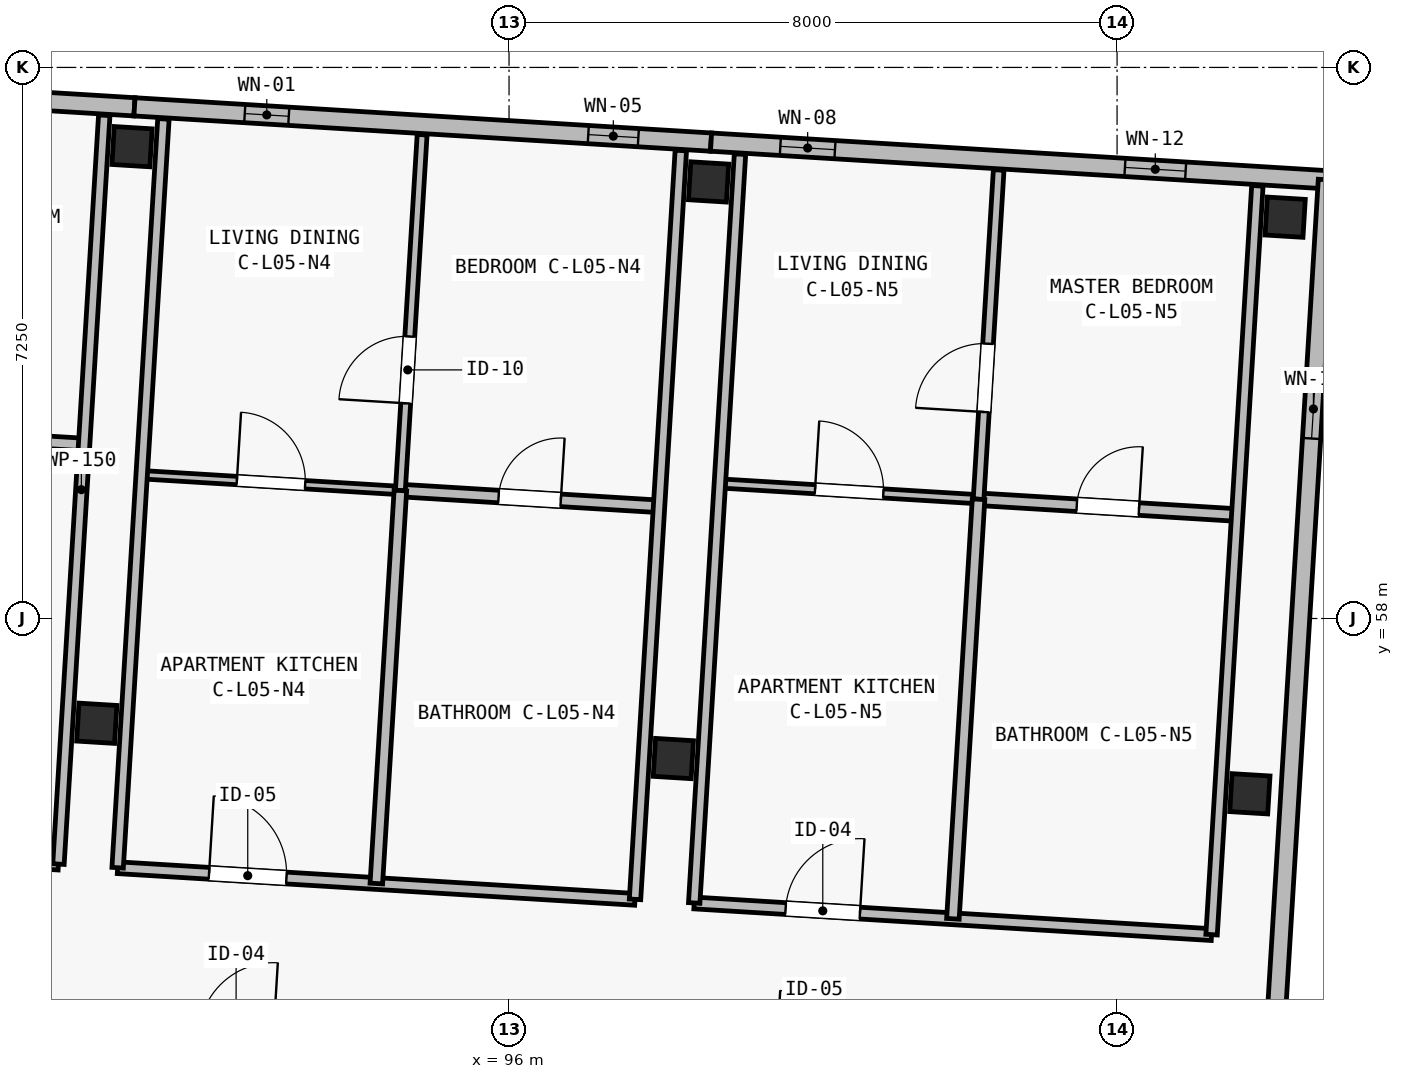
"""IFC4 building model, lengths in metres.
Left out: names, types, materials, properties, quantities, classifications, styles, units other than length and angle.
Written with IfcOpenShell. Run it as: python <this file> out.ifc"""

import sys

from ifc_helpers import new_model, si_unit, direction, frame, frame_2d, origin, origin_2d, place, context, subcontext, project, spatial, rectangle, extrude, element, fill, save


model = new_model("IFC4")
c1 = context("Model", 3, precision=1e-05, world=origin(), true_north=direction((0.0, 1.0)))
c2 = subcontext(c1, "Body", "Model", "MODEL_VIEW")
j1 = project(units=[si_unit("LENGTHUNIT", "METRE"), si_unit("PLANEANGLEUNIT", "RADIAN")], contexts=[c1])
p1 = place(None, origin())
s1 = spatial("IfcSite", under=j1, at=p1, CompositionType="ELEMENT")
p2 = place(p1, origin())
s2 = spatial("IfcBuilding", under=s1, at=p2, CompositionType="ELEMENT")
p3 = place(p2, frame((0.0, 0.0, 18.15)))
s3 = spatial("IfcBuildingStorey", under=s2, at=p3, CompositionType="ELEMENT", Elevation=18.15)
for number, where, z_axis, x_axis in (
    (1, (90.576, 56.622, 0.0), (0.0, 0.0, 1.0), (0.998, -0.061, 0.0)),
    (2, (91.04, 64.208, 0.0), (0.0, 0.0, 1.0), (0.998, -0.061, 0.0)),
    (3, (98.162, 56.158, 0.0), (0.0, 0.0, 1.0), (0.998, -0.061, 0.0)),
    (4, (98.626, 63.744, 0.0), (0.0, 0.0, 1.0), (0.998, -0.061, 0.0)),
    (5, (105.748, 55.694, 0.0), (0.0, 0.0, 1.0), (0.998, -0.061, 0.0)),
    (6, (106.211, 63.28, 0.0), (0.0, 0.0, 1.0), (0.998, -0.061, 0.0)),
):
    element("IfcColumn", number, at=place(p3, frame(where, z_axis=z_axis, x_axis=x_axis)), inside=s3, PredefinedType="COLUMN", context=c2, shape_type="SweptSolid", body=[
        extrude(rectangle(XDim=0.5, YDim=0.5, at=origin_2d()), origin(), (0.0, 0.0, 1.0), 3.25),
    ])
p4 = place(p3, frame((83.486, 65.196, 0.0), z_axis=(0.0, 0.0, 1.0), x_axis=(0.998135669243, -0.061034300063, 0.0)))
e7 = element("IfcWall", 7, at=p4, inside=s3, PredefinedType="SOLIDWALL", context=c2, shape_type="SweptSolid", body=[
    extrude(rectangle(XDim=7.6, YDim=0.24, at=frame_2d((3.8, 0.0))), origin(), (0.0, 0.0, 1.0), 3.0),
])
p5 = place(p4, frame((1.807, 0.0, 0.44)))
e8 = element("IfcOpeningElement", 8, at=p5, cuts=e7, PredefinedType="OPENING", context=c2, shape_type="SweptSolid", body=[
    extrude(rectangle(XDim=0.74, YDim=2.26, at=frame_2d((0.37, 1.13))), frame((0.0, 0.135, 0.0), z_axis=(0.0, -1.0, 0.0), x_axis=(1.0, 0.0, 0.0)), (0.0, 0.0, 1.0), 0.27),
])
p6 = place(p4, frame((5.006, 0.0, 0.5)))
e9 = element("IfcOpeningElement", 9, at=p6, cuts=e7, PredefinedType="OPENING", context=c2, shape_type="SweptSolid", body=[
    extrude(rectangle(XDim=0.82, YDim=2.18, at=frame_2d((0.41, 1.09))), frame((0.0, 0.135, 0.0), z_axis=(0.0, -1.0, 0.0), x_axis=(1.0, 0.0, 0.0)), (0.0, 0.0, 1.0), 0.27),
])
p7 = place(p3, frame((91.072, 64.732, 0.0), z_axis=(0.0, 0.0, 1.0), x_axis=(0.998133591969, -0.061068261669, 0.0)))
e10 = element("IfcWall", 10, at=p7, inside=s3, PredefinedType="SOLIDWALL", context=c2, shape_type="SweptSolid", body=[
    extrude(rectangle(XDim=7.6, YDim=0.24, at=frame_2d((3.8, 0.0))), origin(), (0.0, 0.0, 1.0), 3.0),
])
p8 = place(p7, frame((1.454, 0.0, 0.5)))
e11 = element("IfcOpeningElement", 11, at=p8, cuts=e10, PredefinedType="OPENING", context=c2, shape_type="SweptSolid", body=[
    extrude(rectangle(XDim=0.58, YDim=2.16, at=frame_2d((0.29, 1.08))), frame((0.0, 0.135, 0.0), z_axis=(0.0, -1.0, 0.0), x_axis=(1.0, 0.0, 0.0)), (0.0, 0.0, 1.0), 0.27),
])
p9 = place(p7, frame((5.982, 0.0, 0.44)))
e12 = element("IfcOpeningElement", 12, at=p9, cuts=e10, PredefinedType="OPENING", context=c2, shape_type="SweptSolid", body=[
    extrude(rectangle(XDim=0.66, YDim=2.32, at=frame_2d((0.33, 1.16))), frame((0.0, 0.135, 0.0), z_axis=(0.0, -1.0, 0.0), x_axis=(1.0, 0.0, 0.0)), (0.0, 0.0, 1.0), 0.27),
])
p10 = place(p3, frame((98.658, 64.268, 0.0), z_axis=(0.0, 0.0, 1.0), x_axis=(0.998134248939, -0.061057522844, 0.0)))
e13 = element("IfcWall", 13, at=p10, inside=s3, PredefinedType="SOLIDWALL", context=c2, shape_type="SweptSolid", body=[
    extrude(rectangle(XDim=8.125, YDim=0.24, at=frame_2d((4.062, 0.0))), origin(), (0.0, 0.0, 1.0), 3.0),
])
p11 = place(p10, frame((0.914, 0.0, 0.44)))
e14 = element("IfcOpeningElement", 14, at=p11, cuts=e13, PredefinedType="OPENING", context=c2, shape_type="SweptSolid", body=[
    extrude(rectangle(XDim=0.72, YDim=2.16, at=frame_2d((0.36, 1.08))), frame((0.0, 0.135, 0.0), z_axis=(0.0, -1.0, 0.0), x_axis=(1.0, 0.0, 0.0)), (0.0, 0.0, 1.0), 0.27),
])
p12 = place(p10, frame((5.456, 0.0, 0.5)))
e15 = element("IfcOpeningElement", 15, at=p12, cuts=e13, PredefinedType="OPENING", context=c2, shape_type="SweptSolid", body=[
    extrude(rectangle(XDim=0.8, YDim=2.3, at=frame_2d((0.4, 1.15))), frame((0.0, 0.135, 0.0), z_axis=(0.0, -1.0, 0.0), x_axis=(1.0, 0.0, 0.0)), (0.0, 0.0, 1.0), 0.27),
])
p13 = place(p3, frame((106.768, 63.771, 0.0), z_axis=(0.0, 0.0, 1.0), x_axis=(-0.061053332998, -0.99813450523, 0.0)))
e16 = element("IfcWall", 16, at=p13, inside=s3, PredefinedType="SOLIDWALL", context=c2, shape_type="SweptSolid", body=[
    extrude(rectangle(XDim=20.65, YDim=0.24, at=frame_2d((10.325, 0.0))), origin(), (0.0, 0.0, 1.0), 3.0),
])
p14 = place(p13, frame((2.63, 0.0, 0.52)))
e17 = element("IfcOpeningElement", 17, at=p14, cuts=e16, PredefinedType="OPENING", context=c2, shape_type="SweptSolid", body=[
    extrude(rectangle(XDim=0.78, YDim=2.2, at=frame_2d((0.39, 1.1))), frame((0.0, 0.135, 0.0), z_axis=(0.0, -1.0, 0.0), x_axis=(1.0, 0.0, 0.0)), (0.0, 0.0, 1.0), 0.27),
])
p15 = place(p13, frame((17.04, 0.0, 0.45)))
e18 = element("IfcOpeningElement", 18, at=p15, cuts=e16, PredefinedType="OPENING", context=c2, shape_type="SweptSolid", body=[
    extrude(rectangle(XDim=0.62, YDim=2.28, at=frame_2d((0.31, 1.14))), frame((0.0, 0.135, 0.0), z_axis=(0.0, -1.0, 0.0), x_axis=(1.0, 0.0, 0.0)), (0.0, 0.0, 1.0), 0.27),
])
p16 = place(p3, frame((83.007, 53.097, 0.0), z_axis=(0.0, 0.0, 1.0), x_axis=(0.998135666539, -0.061034344288, 0.0)))
e19 = element("IfcWall", 19, at=p16, inside=s3, PredefinedType="PARTITIONING", context=c2, shape_type="SweptSolid", body=[
    extrude(rectangle(XDim=7.08, YDim=0.155, at=frame_2d((3.54, 0.0))), origin(), (0.0, 0.0, 1.0), 2.97),
])
p17 = place(p16, frame((1.33, 0.0, 0.0)))
e20 = element("IfcOpeningElement", 20, at=p17, cuts=e19, PredefinedType="OPENING", context=c2, shape_type="SweptSolid", body=[
    extrude(rectangle(XDim=1.02, YDim=2.2, at=frame_2d((0.51, 1.1))), frame((0.0, 0.093, 0.0), z_axis=(0.0, -1.0, 0.0), x_axis=(1.0, 0.0, 0.0)), (0.0, 0.0, 1.0), 0.185),
])
p18 = place(p3, frame((83.265, 55.185, 0.0), z_axis=(0.0, 0.0, 1.0), x_axis=(0.998135531673, -0.061036549799, 0.0)))
e21 = element("IfcWall", 21, at=p18, inside=s3, PredefinedType="PARTITIONING", context=c2, shape_type="SweptSolid", body=[
    extrude(rectangle(XDim=6.82, YDim=0.155, at=frame_2d((3.41, 0.0))), origin(), (0.0, 0.0, 1.0), 2.97),
])
p19 = place(p18, frame((1.205, 0.0, 0.0)))
e22 = element("IfcOpeningElement", 22, at=p19, cuts=e21, PredefinedType="OPENING", context=c2, shape_type="SweptSolid", body=[
    extrude(rectangle(XDim=0.98, YDim=2.15, at=frame_2d((0.49, 1.075))), frame((0.0, 0.093, 0.0), z_axis=(0.0, -1.0, 0.0), x_axis=(1.0, 0.0, 0.0)), (0.0, 0.0, 1.0), 0.185),
])
p20 = place(p3, frame((87.006, 60.497, 0.0), z_axis=(0.0, 0.0, 1.0), x_axis=(0.998137711988, -0.061000884486, 0.0)))
e23 = element("IfcWall", 23, at=p20, inside=s3, PredefinedType="PLUMBINGWALL", context=c2, shape_type="SweptSolid", body=[
    extrude(rectangle(XDim=3.41, YDim=0.165, at=frame_2d((1.705, 0.0))), origin(), (0.0, 0.0, 1.0), 2.97),
])
p21 = place(p20, frame((1.295, 0.0, 0.0)))
e24 = element("IfcOpeningElement", 24, at=p21, cuts=e23, PredefinedType="OPENING", context=c2, shape_type="SweptSolid", body=[
    extrude(rectangle(XDim=0.82, YDim=2.08, at=frame_2d((0.41, 1.04))), frame((0.0, 0.097, 0.0), z_axis=(0.0, -1.0, 0.0), x_axis=(1.0, 0.0, 0.0)), (0.0, 0.0, 1.0), 0.195),
])
p22 = place(p3, frame((90.072, 54.769, 0.0), z_axis=(0.0, 0.0, 1.0), x_axis=(0.061047700465, 0.998134849741, 0.0)))
e25 = element("IfcWall", 25, at=p22, inside=s3, PredefinedType="PARTITIONING", context=c2, shape_type="SweptSolid", body=[
    extrude(rectangle(XDim=9.87, YDim=0.15, at=frame_2d((4.935, 0.0))), origin(), (0.0, 0.0, 1.0), 2.97),
])
p23 = place(p3, frame((90.85, 54.721, 0.0), z_axis=(0.0, 0.0, 1.0), x_axis=(0.998135665032, -0.06103436893, 0.0)))
e26 = element("IfcWall", 26, at=p23, inside=s3, PredefinedType="PARTITIONING", context=c2, shape_type="SweptSolid", body=[
    extrude(rectangle(XDim=6.82, YDim=0.155, at=frame_2d((3.41, 0.0))), origin(), (0.0, 0.0, 1.0), 2.97),
])
p24 = place(p23, frame((1.205, 0.0, 0.0)))
e27 = element("IfcOpeningElement", 27, at=p24, cuts=e26, PredefinedType="OPENING", context=c2, shape_type="SweptSolid", body=[
    extrude(rectangle(XDim=1.02, YDim=2.2, at=frame_2d((0.51, 1.1))), frame((0.0, 0.093, 0.0), z_axis=(0.0, -1.0, 0.0), x_axis=(1.0, 0.0, 0.0)), (0.0, 0.0, 1.0), 0.185),
])
p25 = place(p3, frame((91.167, 59.892, 0.0), z_axis=(0.0, 0.0, 1.0), x_axis=(0.998133617109, -0.061067850767, 0.0)))
e28 = element("IfcWall", 28, at=p25, inside=s3, PredefinedType="PARTITIONING", context=c2, shape_type="SweptSolid", body=[
    extrude(rectangle(XDim=3.41, YDim=0.11, at=frame_2d((1.705, 0.0))), origin(), (0.0, 0.0, 1.0), 2.97),
])
p26 = place(p25, frame((1.255, 0.0, 0.0)))
e29 = element("IfcOpeningElement", 29, at=p26, cuts=e28, PredefinedType="OPENING", context=c2, shape_type="SweptSolid", body=[
    extrude(rectangle(XDim=0.9, YDim=2.1, at=frame_2d((0.45, 1.05))), frame((0.0, 0.07, 0.0), z_axis=(0.0, -1.0, 0.0), x_axis=(1.0, 0.0, 0.0)), (0.0, 0.0, 1.0), 0.14),
])
p27 = place(p3, frame((94.57, 59.684, 0.0), z_axis=(0.0, 0.0, 1.0), x_axis=(0.998133350094, -0.061072214879, 0.0)))
e30 = element("IfcWall", 30, at=p27, inside=s3, PredefinedType="PLUMBINGWALL", context=c2, shape_type="SweptSolid", body=[
    extrude(rectangle(XDim=3.41, YDim=0.165, at=frame_2d((1.705, 0.0))), origin(), (0.0, 0.0, 1.0), 2.97),
])
p28 = place(p27, frame((1.295, 0.0, 0.0)))
e31 = element("IfcOpeningElement", 31, at=p28, cuts=e30, PredefinedType="OPENING", context=c2, shape_type="SweptSolid", body=[
    extrude(rectangle(XDim=0.82, YDim=2.08, at=frame_2d((0.41, 1.04))), frame((0.0, 0.097, 0.0), z_axis=(0.0, -1.0, 0.0), x_axis=(1.0, 0.0, 0.0)), (0.0, 0.0, 1.0), 0.195),
])
p29 = place(p3, frame((94.57, 59.684, 0.0), z_axis=(0.0, 0.0, 1.0), x_axis=(0.061062434628, 0.998133948465, 0.0)))
e32 = element("IfcWall", 32, at=p29, inside=s3, PredefinedType="PARTITIONING", context=c2, shape_type="SweptSolid", body=[
    extrude(rectangle(XDim=4.69, YDim=0.13, at=frame_2d((2.345, 0.0))), origin(), (0.0, 0.0, 1.0), 2.97),
])
p30 = place(p29, frame((1.15, 0.0, 0.0)))
e33 = element("IfcOpeningElement", 33, at=p30, cuts=e32, PredefinedType="OPENING", context=c2, shape_type="SweptSolid", body=[
    extrude(rectangle(XDim=0.88, YDim=2.1, at=frame_2d((0.44, 1.05))), frame((0.0, 0.08, 0.0), z_axis=(0.0, -1.0, 0.0), x_axis=(1.0, 0.0, 0.0)), (0.0, 0.0, 1.0), 0.16),
])
p31 = place(p3, frame((94.254, 54.513, 0.0), z_axis=(0.0, 0.0, 1.0), x_axis=(0.061081315517, 0.998132793217, 0.0)))
e34 = element("IfcWall", 34, at=p31, inside=s3, PredefinedType="PLUMBINGWALL", context=c2, shape_type="SweptSolid", body=[
    extrude(rectangle(XDim=5.18, YDim=0.165, at=frame_2d((2.59, 0.0))), origin(), (0.0, 0.0, 1.0), 2.97),
])
for number, where, z_axis, x_axis in (
    (35, (90.85, 54.721, 0.0), (0.0, 0.0, 1.0), (0.061, 0.998, 0.0)),
    (36, (97.658, 54.305, 0.0), (0.0, 0.0, 1.0), (0.061, 0.998, 0.0)),
):
    element("IfcWall", number, at=place(p3, frame(where, z_axis=z_axis, x_axis=x_axis)), inside=s3, PredefinedType="PARTITIONING", context=c2, shape_type="SweptSolid", body=[
        extrude(rectangle(XDim=9.87, YDim=0.15, at=frame_2d((4.935, 0.0))), origin(), (0.0, 0.0, 1.0), 2.97),
    ])
p32 = place(p3, frame((98.436, 54.258, 0.0), z_axis=(0.0, 0.0, 1.0), x_axis=(0.998133350094, -0.061072214879, 0.0)))
e37 = element("IfcWall", 37, at=p32, inside=s3, PredefinedType="PARTITIONING", context=c2, shape_type="SweptSolid", body=[
    extrude(rectangle(XDim=6.82, YDim=0.155, at=frame_2d((3.41, 0.0))), origin(), (0.0, 0.0, 1.0), 2.97),
])
p33 = place(p32, frame((1.205, 0.0, 0.0)))
e38 = element("IfcOpeningElement", 38, at=p33, cuts=e37, PredefinedType="OPENING", context=c2, shape_type="SweptSolid", body=[
    extrude(rectangle(XDim=0.98, YDim=2.15, at=frame_2d((0.49, 1.075))), frame((0.0, 0.093, 0.0), z_axis=(0.0, -1.0, 0.0), x_axis=(1.0, 0.0, 0.0)), (0.0, 0.0, 1.0), 0.185),
])
p34 = place(p3, frame((98.774, 59.777, 0.0), z_axis=(0.0, 0.0, 1.0), x_axis=(0.998137711988, -0.061000884486, 0.0)))
e39 = element("IfcWall", 39, at=p34, inside=s3, PredefinedType="PARTITIONING", context=c2, shape_type="SweptSolid", body=[
    extrude(rectangle(XDim=3.41, YDim=0.12, at=frame_2d((1.705, 0.0))), origin(), (0.0, 0.0, 1.0), 2.97),
])
p35 = place(p34, frame((1.255, 0.0, 0.0)))
e40 = element("IfcOpeningElement", 40, at=p35, cuts=e39, PredefinedType="OPENING", context=c2, shape_type="SweptSolid", body=[
    extrude(rectangle(XDim=0.9, YDim=2.1, at=frame_2d((0.45, 1.05))), frame((0.0, 0.075, 0.0), z_axis=(0.0, -1.0, 0.0), x_axis=(1.0, 0.0, 0.0)), (0.0, 0.0, 1.0), 0.15),
])
p36 = place(p3, frame((102.177, 59.569, 0.0), z_axis=(0.0, 0.0, 1.0), x_axis=(0.998133350094, -0.061072214879, 0.0)))
e41 = element("IfcWall", 41, at=p36, inside=s3, PredefinedType="PLUMBINGWALL", context=c2, shape_type="SweptSolid", body=[
    extrude(rectangle(XDim=3.41, YDim=0.165, at=frame_2d((1.705, 0.0))), origin(), (0.0, 0.0, 1.0), 2.97),
])
p37 = place(p36, frame((1.295, 0.0, 0.0)))
e42 = element("IfcOpeningElement", 42, at=p37, cuts=e41, PredefinedType="OPENING", context=c2, shape_type="SweptSolid", body=[
    extrude(rectangle(XDim=0.82, YDim=2.08, at=frame_2d((0.41, 1.04))), frame((0.0, 0.097, 0.0), z_axis=(0.0, -1.0, 0.0), x_axis=(1.0, 0.0, 0.0)), (0.0, 0.0, 1.0), 0.195),
])
p38 = place(p3, frame((102.177, 59.569, 0.0), z_axis=(0.0, 0.0, 1.0), x_axis=(0.061036861365, 0.998135512621, 0.0)))
e43 = element("IfcWall", 43, at=p38, inside=s3, PredefinedType="PARTITIONING", context=c2, shape_type="SweptSolid", body=[
    extrude(rectangle(XDim=4.34, YDim=0.14, at=frame_2d((2.17, 0.0))), origin(), (0.0, 0.0, 1.0), 2.97),
])
p39 = place(p38, frame((1.15, 0.0, 0.0)))
e44 = element("IfcOpeningElement", 44, at=p39, cuts=e43, PredefinedType="OPENING", context=c2, shape_type="SweptSolid", body=[
    extrude(rectangle(XDim=0.9, YDim=2.1, at=frame_2d((0.45, 1.05))), frame((0.0, 0.085, 0.0), z_axis=(0.0, -1.0, 0.0), x_axis=(1.0, 0.0, 0.0)), (0.0, 0.0, 1.0), 0.17),
])
p40 = place(p3, frame((101.84, 54.049, 0.0), z_axis=(0.0, 0.0, 1.0), x_axis=(0.061056206715, 0.998134329447, 0.0)))
e45 = element("IfcWall", 45, at=p40, inside=s3, PredefinedType="PLUMBINGWALL", context=c2, shape_type="SweptSolid", body=[
    extrude(rectangle(XDim=5.53, YDim=0.165, at=frame_2d((2.765, 0.0))), origin(), (0.0, 0.0, 1.0), 2.97),
])
for number, where, z_axis, x_axis in (
    (46, (98.436, 54.258, 0.0), (0.0, 0.0, 1.0), (0.061, 0.998, 0.0)),
    (47, (105.243, 53.841, 0.0), (0.0, 0.0, 1.0), (0.061, 0.998, 0.0)),
):
    element("IfcWall", number, at=place(p3, frame(where, z_axis=z_axis, x_axis=x_axis)), inside=s3, PredefinedType="PARTITIONING", context=c2, shape_type="SweptSolid", body=[
        extrude(rectangle(XDim=9.87, YDim=0.15, at=frame_2d((4.935, 0.0))), origin(), (0.0, 0.0, 1.0), 2.97),
    ])
p41 = place(p8, origin())
e48 = element("IfcWindow", 48, at=p41, inside=s3, PartitioningType="SINGLE_PANEL", PredefinedType="WINDOW", context=c2, shape_type="SweptSolid", body=[
    extrude(rectangle(XDim=0.58, YDim=2.16, at=frame_2d((0.29, 1.08))), frame((0.0, 0.03, 0.0), z_axis=(0.0, -1.0, 0.0), x_axis=(1.0, 0.0, 0.0)), (0.0, 0.0, 1.0), 0.06),
])
fill(e11, e48)
p42 = place(p9, origin())
e49 = element("IfcWindow", 49, at=p42, inside=s3, PartitioningType="SINGLE_PANEL", PredefinedType="WINDOW", context=c2, shape_type="SweptSolid", body=[
    extrude(rectangle(XDim=0.66, YDim=2.32, at=frame_2d((0.33, 1.16))), frame((0.0, 0.03, 0.0), z_axis=(0.0, -1.0, 0.0), x_axis=(1.0, 0.0, 0.0)), (0.0, 0.0, 1.0), 0.06),
])
fill(e12, e49)
p43 = place(p11, origin())
e50 = element("IfcWindow", 50, at=p43, inside=s3, PartitioningType="SINGLE_PANEL", PredefinedType="WINDOW", context=c2, shape_type="SweptSolid", body=[
    extrude(rectangle(XDim=0.72, YDim=2.16, at=frame_2d((0.36, 1.08))), frame((0.0, 0.03, 0.0), z_axis=(0.0, -1.0, 0.0), x_axis=(1.0, 0.0, 0.0)), (0.0, 0.0, 1.0), 0.06),
])
fill(e14, e50)
p44 = place(p12, origin())
e51 = element("IfcWindow", 51, at=p44, inside=s3, PartitioningType="SINGLE_PANEL", PredefinedType="WINDOW", context=c2, shape_type="SweptSolid", body=[
    extrude(rectangle(XDim=0.8, YDim=2.3, at=frame_2d((0.4, 1.15))), frame((0.0, 0.03, 0.0), z_axis=(0.0, -1.0, 0.0), x_axis=(1.0, 0.0, 0.0)), (0.0, 0.0, 1.0), 0.06),
])
fill(e15, e51)
p45 = place(p14, origin())
e52 = element("IfcWindow", 52, at=p45, inside=s3, PartitioningType="SINGLE_PANEL", PredefinedType="WINDOW", context=c2, shape_type="SweptSolid", body=[
    extrude(rectangle(XDim=0.78, YDim=2.2, at=frame_2d((0.39, 1.1))), frame((0.0, 0.03, 0.0), z_axis=(0.0, -1.0, 0.0), x_axis=(1.0, 0.0, 0.0)), (0.0, 0.0, 1.0), 0.06),
])
fill(e17, e52)
p46 = place(p24, origin())
e53 = element("IfcDoor", 53, at=p46, inside=s3, OperationType="SINGLE_SWING_LEFT", PredefinedType="DOOR", context=c2, shape_type="SweptSolid", body=[
    extrude(rectangle(XDim=1.02, YDim=2.2, at=frame_2d((0.51, 1.1))), frame((0.0, 0.025, 0.0), z_axis=(0.0, -1.0, 0.0), x_axis=(1.0, 0.0, 0.0)), (0.0, 0.0, 1.0), 0.05),
])
fill(e27, e53)
p47 = place(p26, origin())
e54 = element("IfcDoor", 54, at=p47, inside=s3, OperationType="SINGLE_SWING_LEFT", PredefinedType="DOOR", context=c2, shape_type="SweptSolid", body=[
    extrude(rectangle(XDim=0.9, YDim=2.1, at=frame_2d((0.45, 1.05))), frame((0.0, 0.025, 0.0), z_axis=(0.0, -1.0, 0.0), x_axis=(1.0, 0.0, 0.0)), (0.0, 0.0, 1.0), 0.05),
])
fill(e29, e54)
p48 = place(p28, origin())
e55 = element("IfcDoor", 55, at=p48, inside=s3, OperationType="SINGLE_SWING_RIGHT", PredefinedType="DOOR", context=c2, shape_type="SweptSolid", body=[
    extrude(rectangle(XDim=0.82, YDim=2.08, at=frame_2d((0.41, 1.04))), frame((0.0, 0.025, 0.0), z_axis=(0.0, -1.0, 0.0), x_axis=(1.0, 0.0, 0.0)), (0.0, 0.0, 1.0), 0.05),
])
fill(e31, e55)
p49 = place(p30, origin())
e56 = element("IfcDoor", 56, at=p49, inside=s3, OperationType="SINGLE_SWING_LEFT", PredefinedType="DOOR", context=c2, shape_type="SweptSolid", body=[
    extrude(rectangle(XDim=0.88, YDim=2.1, at=frame_2d((0.44, 1.05))), frame((0.0, 0.025, 0.0), z_axis=(0.0, -1.0, 0.0), x_axis=(1.0, 0.0, 0.0)), (0.0, 0.0, 1.0), 0.05),
])
fill(e33, e56)
p50 = place(p33, origin())
e57 = element("IfcDoor", 57, at=p50, inside=s3, OperationType="SINGLE_SWING_RIGHT", PredefinedType="DOOR", context=c2, shape_type="SweptSolid", body=[
    extrude(rectangle(XDim=0.98, YDim=2.15, at=frame_2d((0.49, 1.075))), frame((0.0, 0.025, 0.0), z_axis=(0.0, -1.0, 0.0), x_axis=(1.0, 0.0, 0.0)), (0.0, 0.0, 1.0), 0.05),
])
fill(e38, e57)
p51 = place(p35, origin())
e58 = element("IfcDoor", 58, at=p51, inside=s3, OperationType="SINGLE_SWING_LEFT", PredefinedType="DOOR", context=c2, shape_type="SweptSolid", body=[
    extrude(rectangle(XDim=0.9, YDim=2.1, at=frame_2d((0.45, 1.05))), frame((0.0, 0.025, 0.0), z_axis=(0.0, -1.0, 0.0), x_axis=(1.0, 0.0, 0.0)), (0.0, 0.0, 1.0), 0.05),
])
fill(e40, e58)
p52 = place(p37, origin())
e59 = element("IfcDoor", 59, at=p52, inside=s3, OperationType="SINGLE_SWING_RIGHT", PredefinedType="DOOR", context=c2, shape_type="SweptSolid", body=[
    extrude(rectangle(XDim=0.82, YDim=2.08, at=frame_2d((0.41, 1.04))), frame((0.0, 0.025, 0.0), z_axis=(0.0, -1.0, 0.0), x_axis=(1.0, 0.0, 0.0)), (0.0, 0.0, 1.0), 0.05),
])
fill(e42, e59)
p53 = place(p39, origin())
e60 = element("IfcDoor", 60, at=p53, inside=s3, OperationType="SINGLE_SWING_LEFT", PredefinedType="DOOR", context=c2, shape_type="SweptSolid", body=[
    extrude(rectangle(XDim=0.9, YDim=2.1, at=frame_2d((0.45, 1.05))), frame((0.0, 0.025, 0.0), z_axis=(0.0, -1.0, 0.0), x_axis=(1.0, 0.0, 0.0)), (0.0, 0.0, 1.0), 0.05),
])
fill(e44, e60)
save(model, sys.argv[1])
